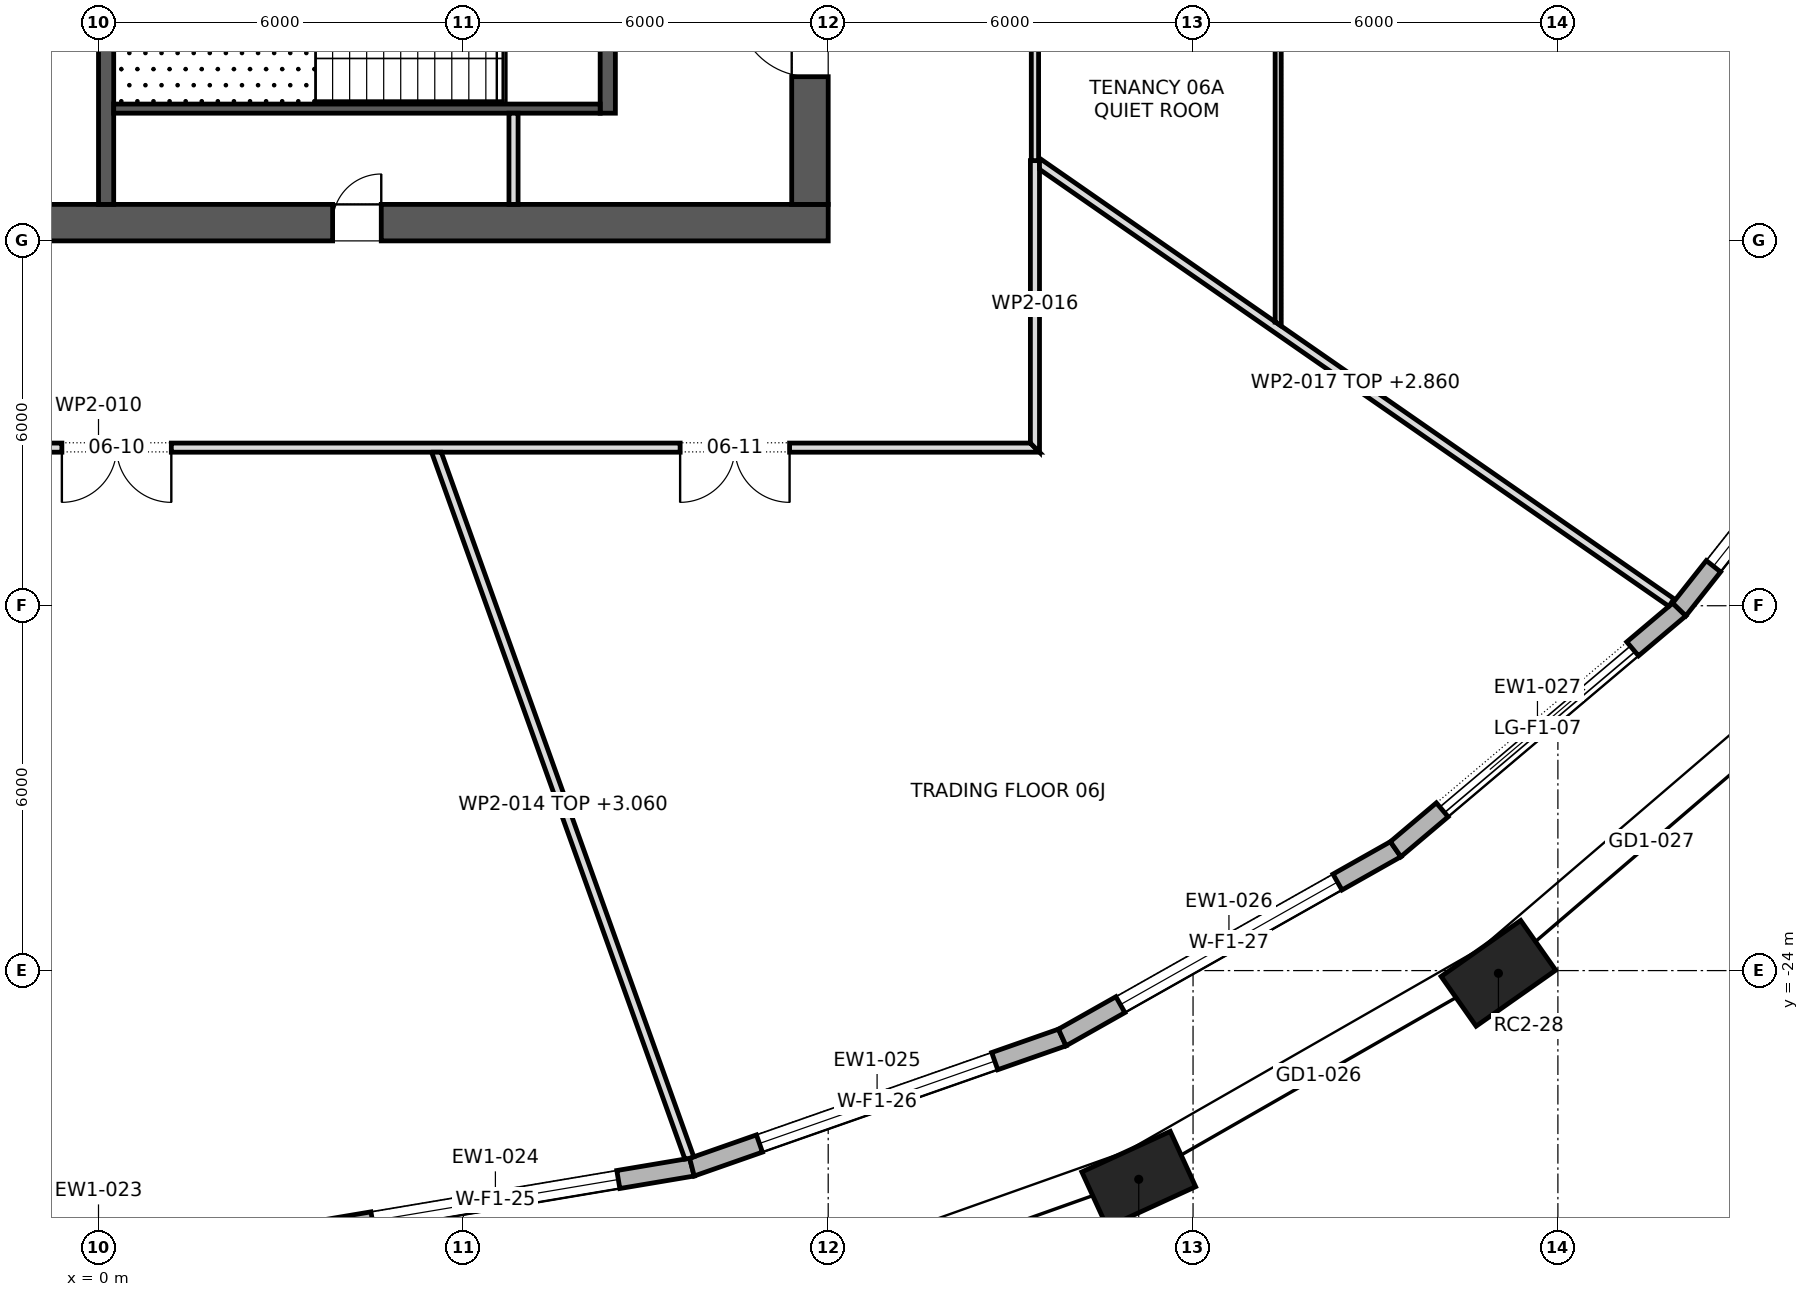
"""IFC4 building model, lengths in metres.
Left out: names, types, materials, properties, quantities, classifications, styles, units other than length and angle.
Written with IfcOpenShell. Run it as: python <this file> out.ifc"""

import sys

from ifc_helpers import new_model, si_unit, direction, frame, frame_2d, origin, origin_2d, place, context, subcontext, project, spatial, polyline, rectangle, outline, extrude, element, fill, save


model = new_model("IFC4")
c1 = context("Model", 3, precision=1e-05, world=origin(), true_north=direction((0.0, 1.0)))
c2 = subcontext(c1, "Body", "Model", "MODEL_VIEW")
j1 = project(units=[si_unit("LENGTHUNIT", "METRE"), si_unit("PLANEANGLEUNIT", "RADIAN")], contexts=[c1])
p1 = place(None, origin())
s1 = spatial("IfcSite", under=j1, at=p1, CompositionType="ELEMENT")
p2 = place(p1, origin())
s2 = spatial("IfcBuilding", under=s1, at=p2, CompositionType="ELEMENT")
p3 = place(p2, frame((0.0, 0.0, 86.5)))
s3 = spatial("IfcBuildingStorey", under=s2, at=p3, CompositionType="ELEMENT", Elevation=86.5)
for number, where, z_axis, x_axis in (
    (1, (17.107, -27.432, 0.0), (0.0, 0.0, 1.0), (0.909, 0.417, 0.0)),
    (2, (23.022, -24.045, 0.0), (0.0, 0.0, 1.0), (0.818, 0.575, 0.0)),
):
    element("IfcColumn", number, at=place(p3, frame(where, z_axis=z_axis, x_axis=x_axis)), inside=s3, PredefinedType="COLUMN", context=c2, shape_type="SweptSolid", body=[
        extrude(rectangle(XDim=1.6, YDim=1.0, at=origin_2d()), origin(), (0.0, 0.0, 1.0), 4.2),
    ])
p4 = place(p3, frame((-12.0, -11.7, 0.0), z_axis=(0.0, 0.0, 1.0), x_axis=(1.0, 0.0, 0.0)))
e3 = element("IfcWall", 3, at=p4, inside=s3, PredefinedType="SHEAR", context=c2, shape_type="SweptSolid", body=[
    extrude(rectangle(XDim=24.0, YDim=0.6, at=frame_2d((12.0, 0.0))), origin(), (0.0, 0.0, 1.0), 4.2),
])
p5 = place(p4, frame((9.975, 0.0, 0.0)))
e4 = element("IfcOpeningElement", 4, at=p5, cuts=e3, PredefinedType="OPENING", context=c2, shape_type="SweptSolid", body=[
    extrude(rectangle(XDim=0.9, YDim=2.1, at=frame_2d((0.45, 1.05))), frame((0.0, 0.312, 0.0), z_axis=(0.0, -1.0, 0.0), x_axis=(1.0, 0.0, 0.0)), (0.0, 0.0, 1.0), 0.624),
])
p6 = place(p4, frame((3.8, 0.0, 0.0)))
e5 = element("IfcOpeningElement", 5, at=p6, cuts=e3, PredefinedType="OPENING", context=c2, shape_type="SweptSolid", body=[
    extrude(rectangle(XDim=0.8, YDim=2.1, at=frame_2d((0.4, 1.05))), frame((0.0, 0.312, 0.0), z_axis=(0.0, -1.0, 0.0), x_axis=(1.0, 0.0, 0.0)), (0.0, 0.0, 1.0), 0.624),
])
p7 = place(p4, frame((5.8, 0.0, 0.0)))
e6 = element("IfcOpeningElement", 6, at=p7, cuts=e3, PredefinedType="OPENING", context=c2, shape_type="SweptSolid", body=[
    extrude(rectangle(XDim=0.8, YDim=2.1, at=frame_2d((0.4, 1.05))), frame((0.0, 0.312, 0.0), z_axis=(0.0, -1.0, 0.0), x_axis=(1.0, 0.0, 0.0)), (0.0, 0.0, 1.0), 0.624),
])
p8 = place(p4, frame((7.5, 0.0, 0.0)))
e7 = element("IfcOpeningElement", 7, at=p8, cuts=e3, PredefinedType="OPENING", context=c2, shape_type="SweptSolid", body=[
    extrude(rectangle(XDim=0.8, YDim=2.1, at=frame_2d((0.4, 1.05))), frame((0.0, 0.312, 0.0), z_axis=(0.0, -1.0, 0.0), x_axis=(1.0, 0.0, 0.0)), (0.0, 0.0, 1.0), 0.624),
])
p9 = place(p4, frame((15.85, 0.0, 0.0)))
e8 = element("IfcOpeningElement", 8, at=p9, cuts=e3, PredefinedType="OPENING", context=c2, shape_type="SweptSolid", body=[
    extrude(rectangle(XDim=0.8, YDim=2.1, at=frame_2d((0.4, 1.05))), frame((0.0, 0.312, 0.0), z_axis=(0.0, -1.0, 0.0), x_axis=(1.0, 0.0, 0.0)), (0.0, 0.0, 1.0), 0.624),
])
p10 = place(p3, frame((11.7, -11.4, 0.0), z_axis=(0.0, 0.0, 1.0), x_axis=(0.0, 1.0, 0.0)))
e9 = element("IfcWall", 9, at=p10, inside=s3, PredefinedType="SHEAR", context=c2, shape_type="SweptSolid", body=[
    extrude(rectangle(XDim=22.8, YDim=0.6, at=frame_2d((11.4, 0.0))), origin(), (0.0, 0.0, 1.0), 4.2),
])
p11 = place(p10, frame((10.2, 0.0, 0.0)))
e10 = element("IfcOpeningElement", 10, at=p11, cuts=e9, PredefinedType="OPENING", context=c2, shape_type="SweptSolid", body=[
    extrude(rectangle(XDim=2.4, YDim=2.1, at=frame_2d((1.2, 1.05))), frame((0.0, 0.312, 0.0), z_axis=(0.0, -1.0, 0.0), x_axis=(1.0, 0.0, 0.0)), (0.0, 0.0, 1.0), 0.624),
])
p12 = place(p10, frame((19.5, 0.0, 0.0)))
e11 = element("IfcOpeningElement", 11, at=p12, cuts=e9, PredefinedType="OPENING", context=c2, shape_type="SweptSolid", body=[
    extrude(rectangle(XDim=1.2, YDim=2.1, at=frame_2d((0.6, 1.05))), frame((0.0, 0.312, 0.0), z_axis=(0.0, -1.0, 0.0), x_axis=(1.0, 0.0, 0.0)), (0.0, 0.0, 1.0), 0.624),
])
p13 = place(p10, frame((2.1, 0.0, 0.0)))
e12 = element("IfcOpeningElement", 12, at=p13, cuts=e9, PredefinedType="OPENING", context=c2, shape_type="SweptSolid", body=[
    extrude(rectangle(XDim=1.2, YDim=2.1, at=frame_2d((0.6, 1.05))), frame((0.0, 0.312, 0.0), z_axis=(0.0, -1.0, 0.0), x_axis=(1.0, 0.0, 0.0)), (0.0, 0.0, 1.0), 0.624),
])
p14 = place(p3, frame((3.295, -28.319, 0.0), z_axis=(0.0, 0.0, 1.0), x_axis=(0.986162431544, 0.165781961053, 0.0)))
e13 = element("IfcWall", 13, at=p14, inside=s3, PredefinedType="STANDARD", context=c2, shape_type="SweptSolid", body=[
    extrude(outline(polyline([(-0.012, -0.15), (6.568, -0.15), (6.542, 0.15), (0.012, 0.15), (-0.012, -0.15)])), origin(), (0.0, 0.0, 1.0), 3.9),
])
p15 = place(p14, frame((1.227, 0.0, 0.6)))
e14 = element("IfcOpeningElement", 14, at=p15, cuts=e13, PredefinedType="OPENING", context=c2, shape_type="SweptSolid", body=[
    extrude(rectangle(XDim=4.1, YDim=2.85, at=frame_2d((2.05, 1.425))), frame((0.0, 0.162, 0.0), z_axis=(0.0, -1.0, 0.0), x_axis=(1.0, 0.0, 0.0)), (0.0, 0.0, 1.0), 0.324),
])
p16 = place(p3, frame((9.759, -27.232, 0.0), z_axis=(0.0, 0.0, 1.0), x_axis=(0.943820008365, 0.330459970057, 0.0)))
e15 = element("IfcWall", 15, at=p16, inside=s3, PredefinedType="STANDARD", context=c2, shape_type="SweptSolid", body=[
    extrude(outline(polyline([(-0.013, -0.15), (6.466, -0.15), (6.439, 0.15), (0.013, 0.15), (-0.013, -0.15)])), origin(), (0.0, 0.0, 1.0), 3.9),
])
p17 = place(p16, frame((1.176, 0.0, 0.6)))
e16 = element("IfcOpeningElement", 16, at=p17, cuts=e15, PredefinedType="OPENING", context=c2, shape_type="SweptSolid", body=[
    extrude(rectangle(XDim=4.1, YDim=2.85, at=frame_2d((2.05, 1.425))), frame((0.0, 0.162, 0.0), z_axis=(0.0, -1.0, 0.0), x_axis=(1.0, 0.0, 0.0)), (0.0, 0.0, 1.0), 0.324),
])
p18 = place(p3, frame((15.849, -25.1, 0.0), z_axis=(0.0, 0.0, 1.0), x_axis=(0.870737550302, 0.491748023376, 0.0)))
e17 = element("IfcWall", 17, at=p18, inside=s3, PredefinedType="STANDARD", context=c2, shape_type="SweptSolid", body=[
    extrude(outline(polyline([(-0.013, -0.15), (6.311, -0.15), (6.282, 0.15), (0.013, 0.15), (-0.013, -0.15)])), origin(), (0.0, 0.0, 1.0), 3.9),
])
p19 = place(p18, frame((1.098, 0.0, 0.6)))
e18 = element("IfcOpeningElement", 18, at=p19, cuts=e17, PredefinedType="OPENING", context=c2, shape_type="SweptSolid", body=[
    extrude(rectangle(XDim=4.1, YDim=2.85, at=frame_2d((2.05, 1.425))), frame((0.0, 0.162, 0.0), z_axis=(0.0, -1.0, 0.0), x_axis=(1.0, 0.0, 0.0)), (0.0, 0.0, 1.0), 0.324),
])
p20 = place(p3, frame((21.332, -22.004, 0.0), z_axis=(0.0, 0.0, 1.0), x_axis=(0.763753100684, 0.645508482667, 0.0)))
e19 = element("IfcWall", 19, at=p20, inside=s3, PredefinedType="STANDARD", context=c2, shape_type="SweptSolid", body=[
    extrude(outline(polyline([(-0.014, -0.15), (6.123, -0.15), (6.092, 0.15), (0.014, 0.15), (-0.014, -0.15)])), origin(), (0.0, 0.0, 1.0), 3.9),
])
p21 = place(p20, frame((1.004, 0.0, 0.0)))
e20 = element("IfcOpeningElement", 20, at=p21, cuts=e19, PredefinedType="OPENING", context=c2, shape_type="SweptSolid", body=[
    extrude(rectangle(XDim=4.1, YDim=3.45, at=frame_2d((2.05, 1.725))), frame((0.0, 0.162, 0.0), z_axis=(0.0, -1.0, 0.0), x_axis=(1.0, 0.0, 0.0)), (0.0, 0.0, 1.0), 0.324),
])
p22 = place(p3, frame((25.996, -18.062, 0.0), z_axis=(0.0, 0.0, 1.0), x_axis=(0.620142219764, 0.784489405452, 0.0)))
e21 = element("IfcWall", 21, at=p22, inside=s3, PredefinedType="STANDARD", context=c2, shape_type="SweptSolid", body=[
    extrude(outline(polyline([(-0.015, -0.15), (5.928, -0.15), (5.896, 0.15), (0.015, 0.15), (-0.015, -0.15)])), origin(), (0.0, 0.0, 1.0), 3.9),
])
p23 = place(p22, frame((0.906, 0.0, 0.6)))
e22 = element("IfcOpeningElement", 22, at=p23, cuts=e21, PredefinedType="OPENING", context=c2, shape_type="SweptSolid", body=[
    extrude(rectangle(XDim=4.1, YDim=2.85, at=frame_2d((2.05, 1.425))), frame((0.0, 0.162, 0.0), z_axis=(0.0, -1.0, 0.0), x_axis=(1.0, 0.0, 0.0)), (0.0, 0.0, 1.0), 0.324),
])
p24 = place(p3, frame((0.125, -11.4, 0.0), z_axis=(0.0, 0.0, 1.0), x_axis=(0.0, 1.0, 0.0)))
e23 = element("IfcWall", 23, at=p24, inside=s3, PredefinedType="SHEAR", context=c2, shape_type="SweptSolid", body=[
    extrude(rectangle(XDim=4.9, YDim=0.25, at=frame_2d((2.45, 0.0))), origin(), (0.0, 0.0, 1.0), 3.9),
])
p25 = place(p3, frame((8.375, -9.9, 0.0), z_axis=(0.0, 0.0, 1.0), x_axis=(0.0, 1.0, 0.0)))
e24 = element("IfcWall", 24, at=p25, inside=s3, PredefinedType="SHEAR", context=c2, shape_type="SweptSolid", body=[
    extrude(rectangle(XDim=3.4, YDim=0.25, at=frame_2d((1.7, 0.0))), origin(), (0.0, 0.0, 1.0), 3.9),
])
p26 = place(p25, frame((1.175, 0.0, 0.0)))
e25 = element("IfcOpeningElement", 25, at=p26, cuts=e24, PredefinedType="OPENING", context=c2, shape_type="SweptSolid", body=[
    extrude(rectangle(XDim=1.2, YDim=2.1, at=frame_2d((0.6, 1.05))), frame((0.0, 0.137, 0.0), z_axis=(0.0, -1.0, 0.0), x_axis=(1.0, 0.0, 0.0)), (0.0, 0.0, 1.0), 0.274),
])
p27 = place(p3, frame((0.25, -9.825, 0.0), z_axis=(0.0, 0.0, 1.0), x_axis=(1.0, 0.0, 0.0)))
e26 = element("IfcWall", 26, at=p27, inside=s3, PredefinedType="SHEAR", context=c2, shape_type="SweptSolid", body=[
    extrude(rectangle(XDim=8.0, YDim=0.15, at=frame_2d((4.0, 0.0))), origin(), (0.0, 0.0, 1.0), 3.9),
])
p28 = place(p3, frame((6.825, -11.4, 0.0), z_axis=(0.0, 0.0, 1.0), x_axis=(0.0, 1.0, 0.0)))
e27 = element("IfcWall", 27, at=p28, inside=s3, PredefinedType="PARTITIONING", context=c2, shape_type="SweptSolid", body=[
    extrude(rectangle(XDim=1.5, YDim=0.15, at=frame_2d((0.75, 0.0))), origin(), (0.0, 0.0, 1.0), 3.9),
])
p29 = place(p3, frame((-15.475, -15.4, 0.0), z_axis=(0.0, 0.0, 1.0), x_axis=(1.0, 0.0, 0.0)))
e28 = element("IfcWall", 28, at=p29, inside=s3, PredefinedType="PARTITIONING", context=c2, shape_type="SweptSolid", body=[
    extrude(outline(polyline([(0.0, -0.075), (1.935, -0.075), (3.869, -0.075), (5.803, -0.075), (7.738, -0.075), (9.672, -0.075), (11.606, -0.075), (13.541, -0.075), (15.475, -0.075), (17.409, -0.075), (19.344, -0.075), (21.278, -0.075), (23.212, -0.075), (25.147, -0.075), (27.081, -0.075), (29.016, -0.075), (30.95, -0.075), (30.8, 0.075), (28.885, 0.075), (26.969, 0.075), (25.053, 0.075), (23.138, 0.075), (21.222, 0.075), (19.306, 0.075), (17.391, 0.075), (15.475, 0.075), (13.56, 0.075), (11.644, 0.075), (9.728, 0.075), (7.812, 0.075), (5.897, 0.075), (3.981, 0.075), (2.066, 0.075), (0.15, 0.075), (0.0, -0.075)])), origin(), (0.0, 0.0, 1.0), 3.9),
])
p30 = place(p29, frame((4.407, 0.0, 0.0)))
e29 = element("IfcOpeningElement", 29, at=p30, cuts=e28, PredefinedType="OPENING", context=c2, shape_type="SweptSolid", body=[
    extrude(rectangle(XDim=1.8, YDim=2.1, at=frame_2d((0.9, 1.05))), frame((0.0, 0.087, 0.0), z_axis=(0.0, -1.0, 0.0), x_axis=(1.0, 0.0, 0.0)), (0.0, 0.0, 1.0), 0.174),
])
p31 = place(p29, frame((14.873, 0.0, 0.0)))
e30 = element("IfcOpeningElement", 30, at=p31, cuts=e28, PredefinedType="OPENING", context=c2, shape_type="SweptSolid", body=[
    extrude(rectangle(XDim=1.8, YDim=2.1, at=frame_2d((0.9, 1.05))), frame((0.0, 0.087, 0.0), z_axis=(0.0, -1.0, 0.0), x_axis=(1.0, 0.0, 0.0)), (0.0, 0.0, 1.0), 0.174),
])
p32 = place(p29, frame((25.04, 0.0, 0.0)))
e31 = element("IfcOpeningElement", 31, at=p32, cuts=e28, PredefinedType="OPENING", context=c2, shape_type="SweptSolid", body=[
    extrude(rectangle(XDim=1.8, YDim=2.1, at=frame_2d((0.9, 1.05))), frame((0.0, 0.087, 0.0), z_axis=(0.0, -1.0, 0.0), x_axis=(1.0, 0.0, 0.0)), (0.0, 0.0, 1.0), 0.174),
])
p33 = place(p3, frame((5.548, -15.45, 0.0), z_axis=(0.0, 0.0, 1.0), x_axis=(0.337393279859, -0.941363784467, 0.0)))
e32 = element("IfcWall", 32, at=p33, inside=s3, PredefinedType="PARTITIONING", context=c2, shape_type="SweptSolid", body=[
    extrude(outline(polyline([(0.0, -0.075), (1.764, -0.075), (3.528, -0.075), (5.292, -0.075), (7.056, -0.075), (8.82, -0.075), (10.584, -0.075), (12.348, -0.075), (12.362, 0.003), (12.363, 0.057), (12.363, 0.075), (10.604, 0.075), (8.846, 0.075), (7.087, 0.075), (5.329, 0.075), (3.57, 0.075), (1.812, 0.075), (0.053, 0.075), (0.0, -0.074), (0.0, -0.075)])), origin(), (0.0, 0.0, 1.0), 3.06),
])
p34 = place(p3, frame((15.4, -10.68, 0.0), z_axis=(0.0, 0.0, 1.0), x_axis=(0.0, -1.0, 0.0)))
e33 = element("IfcWall", 33, at=p34, inside=s3, PredefinedType="PARTITIONING", context=c2, shape_type="SweptSolid", body=[
    extrude(outline(polyline([(0.0, -0.075), (1.548, -0.075), (3.097, -0.075), (4.645, -0.075), (4.795, 0.075), (3.197, 0.075), (1.598, 0.075), (0.0, 0.075), (0.0, -0.075)])), origin(), (0.0, 0.0, 1.0), 3.9),
])
p35 = place(p3, frame((15.418, -10.692, 0.0), z_axis=(0.0, 0.0, 1.0), x_axis=(0.821423906774, -0.57031812647, 0.0)))
e34 = element("IfcWall", 34, at=p35, inside=s3, PredefinedType="PARTITIONING", context=c2, shape_type="SweptSolid", body=[
    extrude(outline(polyline([(0.122, -0.075), (1.922, -0.075), (3.722, -0.075), (5.522, -0.075), (7.322, -0.075), (9.122, -0.075), (10.922, -0.075), (12.722, -0.075), (12.722, -0.074), (12.722, 0.075), (10.727, 0.075), (8.732, 0.075), (6.737, 0.075), (4.741, 0.075), (4.737, 0.072), (4.735, 0.075), (3.157, 0.075), (1.578, 0.075), (0.0, 0.075), (0.0, 0.074), (0.028, 0.034), (0.04, 0.043), (0.122, -0.075)])), origin(), (0.0, 0.0, 1.0), 2.86),
])
p36 = place(p3, frame((15.4, -4.54, 0.0), z_axis=(0.0, 0.0, 1.0), x_axis=(0.0, -1.0, 0.0)))
e35 = element("IfcWall", 35, at=p36, inside=s3, PredefinedType="PARTITIONING", context=c2, shape_type="SweptSolid", body=[
    extrude(rectangle(XDim=6.14, YDim=0.12, at=frame_2d((3.07, 0.0))), origin(), (0.0, 0.0, 1.0), 3.9),
])
p37 = place(p36, frame((2.57, 0.0, 0.0)))
e36 = element("IfcOpeningElement", 36, at=p37, cuts=e35, PredefinedType="OPENING", context=c2, shape_type="SweptSolid", body=[
    extrude(rectangle(XDim=1.0, YDim=2.1, at=frame_2d((0.5, 1.05))), frame((0.0, 0.072, 0.0), z_axis=(0.0, -1.0, 0.0), x_axis=(1.0, 0.0, 0.0)), (0.0, 0.0, 1.0), 0.144),
])
p38 = place(p3, frame((19.4, -13.4, 0.0), z_axis=(0.0, 0.0, 1.0), x_axis=(0.0, 1.0, 0.0)))
e37 = element("IfcWall", 37, at=p38, inside=s3, PredefinedType="PARTITIONING", context=c2, shape_type="SweptSolid", body=[
    extrude(outline(polyline([(22.1, -0.05), (22.1, -0.049), (22.094, -0.036), (22.1, -0.033), (22.1, -0.027), (22.065, 0.05), (20.186, 0.05), (18.307, 0.05), (16.427, 0.05), (14.548, 0.05), (12.669, 0.05), (10.79, 0.05), (8.91, 0.05), (8.91, 0.05), (8.81, 0.05), (8.81, 0.05), (7.062, 0.05), (5.314, 0.05), (3.566, 0.05), (1.817, 0.05), (0.069, 0.05), (0.0, -0.05), (0.0, -0.05), (1.842, -0.05), (3.683, -0.05), (5.525, -0.05), (7.367, -0.05), (9.208, -0.05), (11.05, -0.05), (12.892, -0.05), (14.734, -0.05), (16.575, -0.05), (18.417, -0.05), (20.259, -0.05), (22.1, -0.05)])), origin(), (0.0, 0.0, 1.0), 3.9),
])
p39 = place(p38, frame((15.061, 0.0, 0.0)))
e38 = element("IfcOpeningElement", 38, at=p39, cuts=e37, PredefinedType="OPENING", context=c2, shape_type="SweptSolid", body=[
    extrude(rectangle(XDim=0.9, YDim=2.1, at=frame_2d((0.45, 1.05))), frame((0.0, 0.062, 0.0), z_axis=(0.0, -1.0, 0.0), x_axis=(1.0, 0.0, 0.0)), (0.0, 0.0, 1.0), 0.124),
])
p40 = place(p15, origin())
e39 = element("IfcWindow", 39, at=p40, inside=s3, PartitioningType="TRIPLE_PANEL_VERTICAL", PredefinedType="WINDOW", context=c2, shape_type="SweptSolid", body=[
    extrude(rectangle(XDim=4.1, YDim=2.85, at=frame_2d((2.05, 1.425))), frame((0.0, 0.03, 0.0), z_axis=(0.0, -1.0, 0.0), x_axis=(1.0, 0.0, 0.0)), (0.0, 0.0, 1.0), 0.06),
])
fill(e14, e39)
p41 = place(p17, origin())
e40 = element("IfcWindow", 40, at=p41, inside=s3, PartitioningType="TRIPLE_PANEL_VERTICAL", PredefinedType="WINDOW", context=c2, shape_type="SweptSolid", body=[
    extrude(rectangle(XDim=4.1, YDim=2.85, at=frame_2d((2.05, 1.425))), frame((0.0, 0.03, 0.0), z_axis=(0.0, -1.0, 0.0), x_axis=(1.0, 0.0, 0.0)), (0.0, 0.0, 1.0), 0.06),
])
fill(e16, e40)
p42 = place(p19, origin())
e41 = element("IfcWindow", 41, at=p42, inside=s3, PartitioningType="TRIPLE_PANEL_VERTICAL", PredefinedType="WINDOW", context=c2, shape_type="SweptSolid", body=[
    extrude(rectangle(XDim=4.1, YDim=2.85, at=frame_2d((2.05, 1.425))), frame((0.0, 0.03, 0.0), z_axis=(0.0, -1.0, 0.0), x_axis=(1.0, 0.0, 0.0)), (0.0, 0.0, 1.0), 0.06),
])
fill(e18, e41)
p43 = place(p21, origin())
e42 = element("IfcDoor", 42, at=p43, inside=s3, OperationType="DOUBLE_DOOR_SLIDING", PredefinedType="DOOR", context=c2, shape_type="SweptSolid", body=[
    extrude(rectangle(XDim=4.1, YDim=3.45, at=frame_2d((2.05, 1.725))), frame((0.0, 0.025, 0.0), z_axis=(0.0, -1.0, 0.0), x_axis=(1.0, 0.0, 0.0)), (0.0, 0.0, 1.0), 0.05),
])
fill(e20, e42)
p44 = place(p23, origin())
e43 = element("IfcWindow", 43, at=p44, inside=s3, PartitioningType="TRIPLE_PANEL_VERTICAL", PredefinedType="WINDOW", context=c2, shape_type="SweptSolid", body=[
    extrude(rectangle(XDim=4.1, YDim=2.85, at=frame_2d((2.05, 1.425))), frame((0.0, 0.03, 0.0), z_axis=(0.0, -1.0, 0.0), x_axis=(1.0, 0.0, 0.0)), (0.0, 0.0, 1.0), 0.06),
])
fill(e22, e43)
p45 = place(p13, origin())
e44 = element("IfcDoor", 44, at=p45, inside=s3, OperationType="SINGLE_SWING_LEFT", PredefinedType="DOOR", context=c2, shape_type="SweptSolid", body=[
    extrude(rectangle(XDim=1.2, YDim=2.1, at=frame_2d((0.6, 1.05))), frame((0.0, 0.025, 0.0), z_axis=(0.0, -1.0, 0.0), x_axis=(1.0, 0.0, 0.0)), (0.0, 0.0, 1.0), 0.05),
])
fill(e12, e44)
p46 = place(p9, origin())
e45 = element("IfcDoor", 45, at=p46, inside=s3, OperationType="SINGLE_SWING_LEFT", PredefinedType="DOOR", context=c2, shape_type="SweptSolid", body=[
    extrude(rectangle(XDim=0.8, YDim=2.1, at=frame_2d((0.4, 1.05))), frame((0.0, 0.025, 0.0), z_axis=(0.0, -1.0, 0.0), x_axis=(1.0, 0.0, 0.0)), (0.0, 0.0, 1.0), 0.05),
])
fill(e8, e45)
p47 = place(p31, frame((1.8, 0.0, 0.0), z_axis=(0.0, 0.0, 1.0), x_axis=(-1.0, 0.0, 0.0)))
e46 = element("IfcDoor", 46, at=p47, inside=s3, OperationType="DOUBLE_DOOR_SINGLE_SWING", PredefinedType="DOOR", context=c2, shape_type="SweptSolid", body=[
    extrude(rectangle(XDim=1.8, YDim=2.1, at=frame_2d((0.9, 1.05))), frame((0.0, 0.025, 0.0), z_axis=(0.0, -1.0, 0.0), x_axis=(1.0, 0.0, 0.0)), (0.0, 0.0, 1.0), 0.05),
])
fill(e30, e46)
p48 = place(p32, frame((1.8, 0.0, 0.0), z_axis=(0.0, 0.0, 1.0), x_axis=(-1.0, 0.0, 0.0)))
e47 = element("IfcDoor", 47, at=p48, inside=s3, OperationType="DOUBLE_DOOR_SINGLE_SWING", PredefinedType="DOOR", context=c2, shape_type="SweptSolid", body=[
    extrude(rectangle(XDim=1.8, YDim=2.1, at=frame_2d((0.9, 1.05))), frame((0.0, 0.025, 0.0), z_axis=(0.0, -1.0, 0.0), x_axis=(1.0, 0.0, 0.0)), (0.0, 0.0, 1.0), 0.05),
])
fill(e31, e47)
save(model, sys.argv[1])
